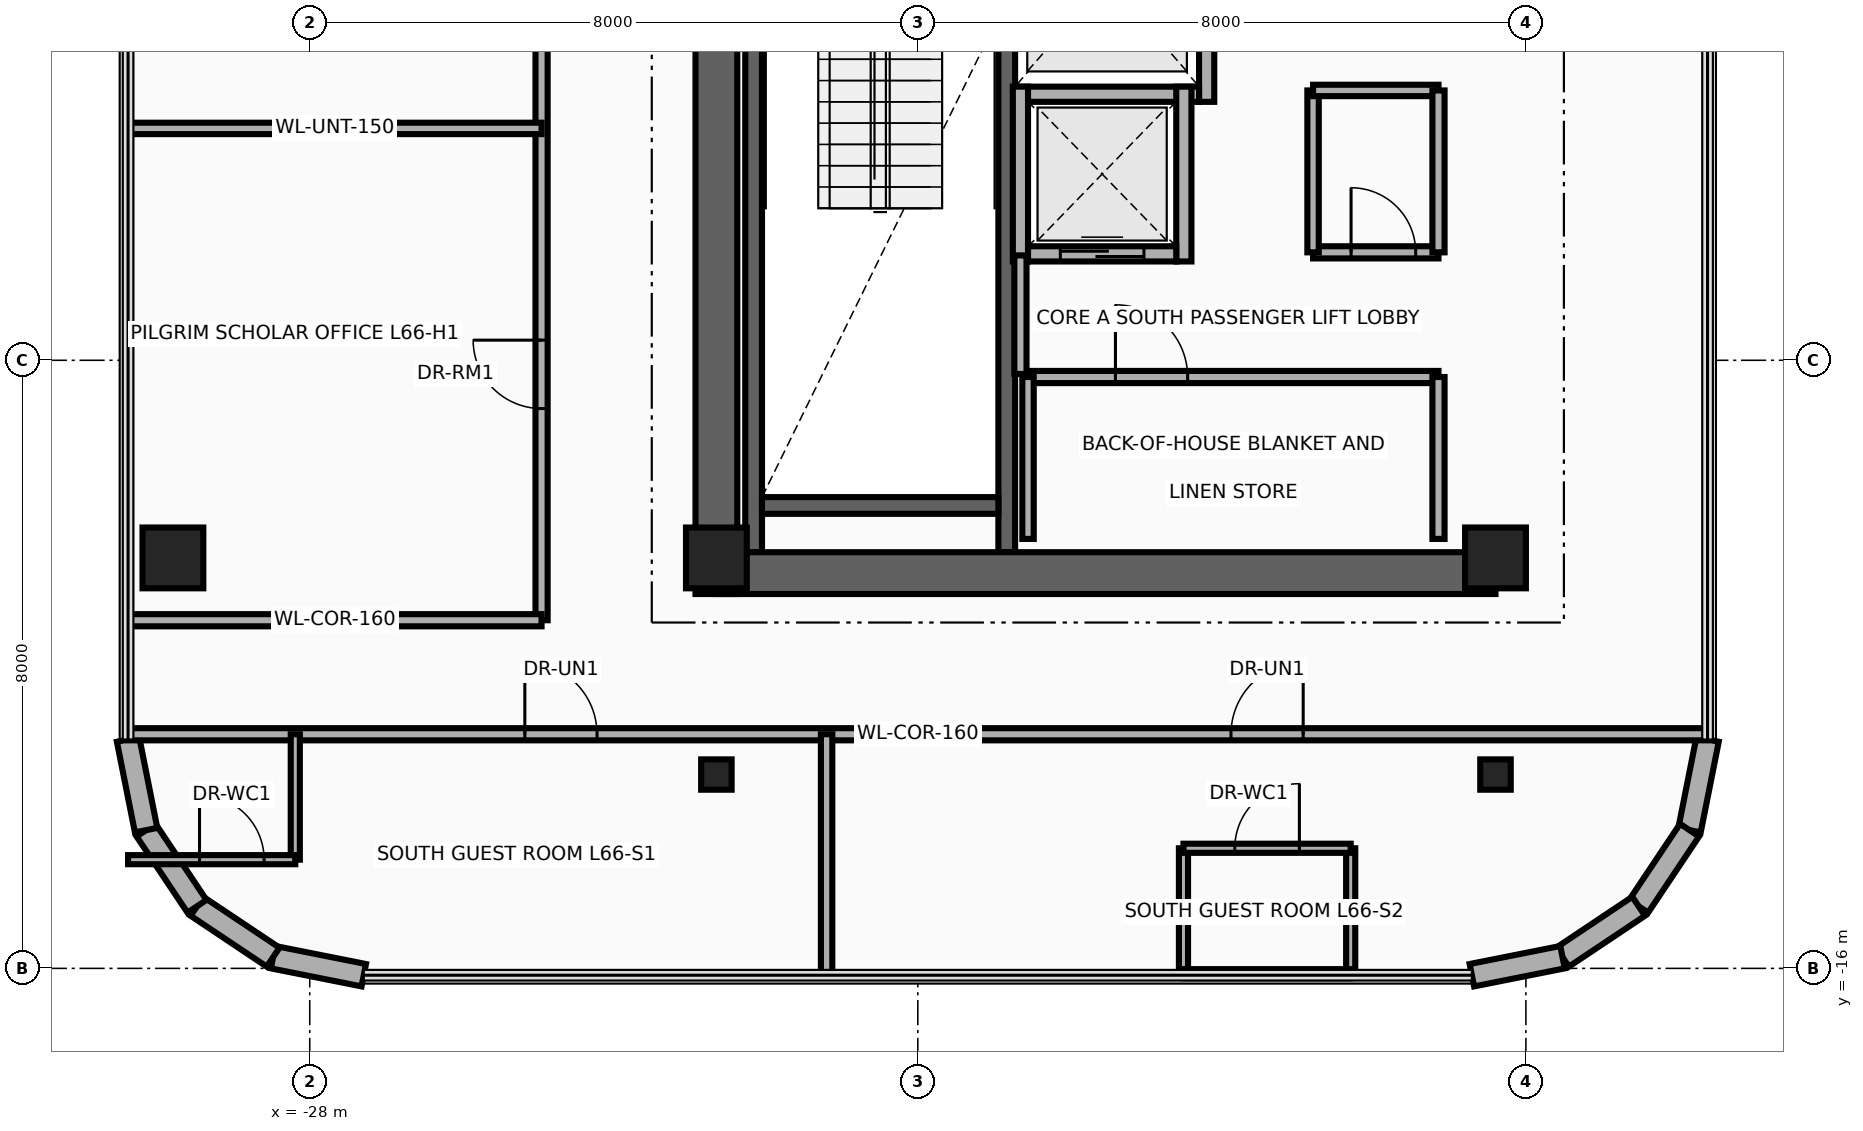
"""IFC4 building model, lengths in metres.
Left out: names, types, materials, properties, quantities, classifications, styles, units other than length and angle.
Written with IfcOpenShell. Run it as: python <this file> out.ifc"""

import sys

from ifc_helpers import new_model, si_unit, direction, frame, frame_2d, origin, origin_2d, place, context, subcontext, project, spatial, rectangle, i_section, extrude, source, transform, mapped, element, fill, save


model = new_model("IFC4")
c1 = context("Model", 3, precision=1e-05, world=origin(), true_north=direction((0.0, 1.0)))
c2 = subcontext(c1, "Body", "Model", "MODEL_VIEW")
j1 = project(units=[si_unit("LENGTHUNIT", "METRE"), si_unit("PLANEANGLEUNIT", "RADIAN")], contexts=[c1])
p1 = place(None, origin())
s1 = spatial("IfcSite", under=j1, at=p1, CompositionType="ELEMENT")
p2 = place(p1, origin())
s2 = spatial("IfcBuilding", under=s1, at=p2, CompositionType="ELEMENT")
p3 = place(p2, frame((0.0, 0.0, 254.5)))
s3 = spatial("IfcBuildingStorey", under=s2, at=p3, CompositionType="ELEMENT", Elevation=254.5)
for number, where, z_axis, x_axis in (
    (1, (-22.16, -10.525, 0.0), (0.0, 0.0, 1.0), (0.0, 1.0, 0.0)),
    (2, (-18.83, -10.525, 0.0), (0.0, 0.0, 1.0), (0.0, 1.0, 0.0)),
):
    element("IfcWall", number, at=place(p3, frame(where, z_axis=z_axis, x_axis=x_axis)), inside=s3, PredefinedType="SHEAR", context=c2, shape_type="SweptSolid", body=[
        extrude(rectangle(XDim=8.745, YDim=0.22, at=frame_2d((4.373, 0.0))), origin(), (0.0, 0.0, 1.0), 3.26),
    ])
p4 = place(p3, frame((-22.05, -9.91, 0.0), z_axis=(0.0, 0.0, 1.0), x_axis=(1.0, 0.0, 0.0)))
e3 = element("IfcWall", 3, at=p4, inside=s3, PredefinedType="SHEAR", context=c2, shape_type="SweptSolid", body=[
    extrude(rectangle(XDim=3.11, YDim=0.22, at=frame_2d((1.555, 0.0))), origin(), (0.0, 0.0, 1.0), 3.26),
])
p5 = place(p3, frame((-22.65, -11.075, 0.0), z_axis=(0.0, 0.0, 1.0), x_axis=(0.0, 1.0, 0.0)))
e4 = element("IfcWall", 4, at=p5, inside=s3, PredefinedType="SHEAR", context=c2, shape_type="SweptSolid", body=[
    extrude(rectangle(XDim=22.15, YDim=0.55, at=frame_2d((11.075, 0.0))), origin(), (0.0, 0.0, 1.0), 3.26),
])
p6 = place(p3, frame((-22.65, -10.8, 0.0), z_axis=(0.0, 0.0, 1.0), x_axis=(1.0, 0.0, 0.0)))
e5 = element("IfcWall", 5, at=p6, inside=s3, PredefinedType="SHEAR", context=c2, shape_type="SweptSolid", body=[
    extrude(rectangle(XDim=10.25, YDim=0.55, at=frame_2d((5.125, 0.0))), origin(), (0.0, 0.0, 1.0), 3.26),
])
m1 = source(origin(), c2, "Body", "SweptSolid", [
    extrude(rectangle(XDim=0.8, YDim=0.8, at=origin_2d()), origin(), (0.0, 0.0, 1.0), 3.5),
])
for number, where, z_axis, x_axis in (
    (6, (-29.8, -10.6, 0.0), (0.0, 0.0, 1.0), (1.0, 0.0, 0.0)),
    (7, (-22.65, -10.6, 0.0), (0.0, 0.0, 1.0), (1.0, 0.0, 0.0)),
    (8, (-12.4, -10.6, 0.0), (0.0, 0.0, 1.0), (1.0, 0.0, 0.0)),
):
    element("IfcColumn", number, at=place(p3, frame(where, z_axis=z_axis, x_axis=x_axis)), inside=s3, PredefinedType="COLUMN", context=c2, shape_type="MappedRepresentation", body=[
        mapped(m1, transform((0.0, 0.0, 0.0), x_axis=(1.0, 0.0, 0.0), y_axis=(0.0, 1.0, 0.0), z_axis=(0.0, 0.0, 1.0), scale=1.0)),
    ])
m2 = source(origin(), c2, "Body", "SweptSolid", [
    extrude(i_section(OverallWidth=0.401, OverallDepth=0.399, WebThickness=0.025, FlangeThickness=0.04, at=origin_2d()), origin(), (0.0, 0.0, 1.0), 3.5),
])
for number, where, z_axis, x_axis in (
    (9, (-22.65, -13.45, 0.0), (0.0, 0.0, 1.0), (1.0, 0.0, 0.0)),
    (10, (-12.4, -13.45, 0.0), (0.0, 0.0, 1.0), (1.0, 0.0, 0.0)),
):
    element("IfcColumn", number, at=place(p3, frame(where, z_axis=z_axis, x_axis=x_axis)), inside=s3, PredefinedType="COLUMN", context=c2, shape_type="MappedRepresentation", body=[
        mapped(m2, transform((0.0, 0.0, 0.0), x_axis=(1.0, 0.0, 0.0), y_axis=(0.0, 1.0, 0.0), z_axis=(0.0, 0.0, 1.0), scale=1.0)),
    ])
p7 = place(p3, frame((-9.61, -12.989, 0.0), z_axis=(0.0, 0.0, 1.0), x_axis=(-0.194996050505, -0.980804027463, 0.0)))
e11 = element("IfcWall", 11, at=p7, inside=s3, PredefinedType="SOLIDWALL", context=c2, shape_type="SweptSolid", body=[
    extrude(rectangle(XDim=1.216, YDim=0.3, at=frame_2d((0.608, 0.0))), origin(), (0.0, 0.0, 1.0), 3.26),
])
for number, where, z_axis, x_axis in (
    (12, (-9.847, -14.182, 0.0), (0.0, 0.0, 1.0), (-0.556, -0.831, 0.0)),
    (13, (-10.517, -15.183, 0.0), (0.0, 0.0, 1.0), (-0.831, -0.556, 0.0)),
):
    element("IfcWall", number, at=place(p3, frame(where, z_axis=z_axis, x_axis=x_axis)), inside=s3, PredefinedType="SOLIDWALL", context=c2, shape_type="SweptSolid", body=[
        extrude(rectangle(XDim=1.205, YDim=0.3, at=frame_2d((0.603, 0.0))), origin(), (0.0, 0.0, 1.0), 3.26),
    ])
for number, where, z_axis, x_axis in (
    (14, (-11.518, -15.853, 0.0), (0.0, 0.0, 1.0), (-0.981, -0.195, 0.0)),
    (15, (-27.289, -16.09, 0.0), (0.0, 0.0, 1.0), (-0.981, 0.195, 0.0)),
):
    element("IfcWall", number, at=place(p3, frame(where, z_axis=z_axis, x_axis=x_axis)), inside=s3, PredefinedType="SOLIDWALL", context=c2, shape_type="SweptSolid", body=[
        extrude(rectangle(XDim=1.216, YDim=0.3, at=frame_2d((0.608, 0.0))), origin(), (0.0, 0.0, 1.0), 3.26),
    ])
for number, where, z_axis, x_axis in (
    (16, (-28.482, -15.853, 0.0), (0.0, 0.0, 1.0), (-0.831, 0.556, 0.0)),
    (17, (-29.483, -15.183, 0.0), (0.0, 0.0, 1.0), (-0.556, 0.831, 0.0)),
):
    element("IfcWall", number, at=place(p3, frame(where, z_axis=z_axis, x_axis=x_axis)), inside=s3, PredefinedType="SOLIDWALL", context=c2, shape_type="SweptSolid", body=[
        extrude(rectangle(XDim=1.205, YDim=0.3, at=frame_2d((0.603, 0.0))), origin(), (0.0, 0.0, 1.0), 3.26),
    ])
p8 = place(p3, frame((-30.153, -14.182, 0.0), z_axis=(0.0, 0.0, 1.0), x_axis=(-0.194996050505, 0.980804027463, 0.0)))
e18 = element("IfcWall", 18, at=p8, inside=s3, PredefinedType="SOLIDWALL", context=c2, shape_type="SweptSolid", body=[
    extrude(rectangle(XDim=1.216, YDim=0.3, at=frame_2d((0.608, 0.0))), origin(), (0.0, 0.0, 1.0), 3.26),
])
p9 = place(p3, frame((-16.2, -4.6, 0.0), z_axis=(0.0, 0.0, 1.0), x_axis=(0.0, 1.0, 0.0)))
e19 = element("IfcWall", 19, at=p9, inside=s3, PredefinedType="MOVABLE", context=c2, shape_type="SweptSolid", body=[
    extrude(rectangle(XDim=3.2, YDim=0.2, at=frame_2d((1.6, 0.0))), origin(), (0.0, 0.0, 1.0), 3.26),
])
p10 = place(p3, frame((-18.72, -4.5, 0.0), z_axis=(0.0, 0.0, 1.0), x_axis=(1.0, 0.0, 0.0)))
e20 = element("IfcWall", 20, at=p10, inside=s3, PredefinedType="MOVABLE", context=c2, shape_type="SweptSolid", body=[
    extrude(rectangle(XDim=2.42, YDim=0.2, at=frame_2d((1.21, 0.0))), origin(), (0.0, 0.0, 1.0), 3.26),
])
for number, where, z_axis, x_axis in (
    (21, (-18.65, -6.7, 0.0), (0.0, 0.0, 1.0), (0.0, 1.0, 0.0)),
    (22, (-16.5, -6.7, 0.0), (0.0, 0.0, 1.0), (0.0, 1.0, 0.0)),
):
    element("IfcWall", number, at=place(p3, frame(where, z_axis=z_axis, x_axis=x_axis)), inside=s3, PredefinedType="MOVABLE", context=c2, shape_type="SweptSolid", body=[
        extrude(rectangle(XDim=2.3, YDim=0.2, at=frame_2d((1.15, 0.0))), origin(), (0.0, 0.0, 1.0), 3.26),
    ])
p11 = place(p3, frame((-18.55, -6.6, 0.0), z_axis=(0.0, 0.0, 1.0), x_axis=(1.0, 0.0, 0.0)))
e23 = element("IfcWall", 23, at=p11, inside=s3, PredefinedType="MOVABLE", context=c2, shape_type="SweptSolid", body=[
    extrude(rectangle(XDim=1.95, YDim=0.2, at=frame_2d((0.975, 0.0))), origin(), (0.0, 0.0, 1.0), 3.26),
])
p12 = place(p11, frame((0.425, 0.0, 0.0)))
e24 = element("IfcOpeningElement", 24, at=p12, cuts=e23, PredefinedType="OPENING", context=c2, shape_type="SweptSolid", body=[
    extrude(rectangle(XDim=1.1, YDim=2.1, at=frame_2d((0.55, 1.05))), frame((0.0, 0.115, 0.0), z_axis=(0.0, -1.0, 0.0), x_axis=(1.0, 0.0, 0.0)), (0.0, 0.0, 1.0), 0.23),
])
p13 = place(p3, frame((-18.65, -8.18, 0.0), z_axis=(0.0, 0.0, 1.0), x_axis=(0.0, 1.0, 0.0)))
e25 = element("IfcWall", 25, at=p13, inside=s3, PredefinedType="PARTITIONING", context=c2, shape_type="SweptSolid", body=[
    extrude(rectangle(XDim=1.56, YDim=0.16, at=frame_2d((0.78, 0.0))), origin(), (0.0, 0.0, 1.0), 3.26),
])
p14 = place(p3, frame((-18.55, -8.22, 0.0), z_axis=(0.0, 0.0, 1.0), x_axis=(1.0, 0.0, 0.0)))
e26 = element("IfcWall", 26, at=p14, inside=s3, PredefinedType="PARTITIONING", context=c2, shape_type="SweptSolid", body=[
    extrude(rectangle(XDim=5.4, YDim=0.16, at=frame_2d((2.7, 0.0))), origin(), (0.0, 0.0, 1.0), 3.26),
])
p15 = place(p14, frame((1.15, 0.0, 0.0)))
e27 = element("IfcOpeningElement", 27, at=p15, cuts=e26, PredefinedType="OPENING", context=c2, shape_type="SweptSolid", body=[
    extrude(rectangle(XDim=0.95, YDim=2.15, at=frame_2d((0.475, 1.075))), frame((0.0, 0.095, 0.0), z_axis=(0.0, -1.0, 0.0), x_axis=(1.0, 0.0, 0.0)), (0.0, 0.0, 1.0), 0.19),
])
p16 = place(p3, frame((-18.55, -10.35, 0.0), z_axis=(0.0, 0.0, 1.0), x_axis=(0.0, 1.0, 0.0)))
e28 = element("IfcWall", 28, at=p16, inside=s3, PredefinedType="PARTITIONING", context=c2, shape_type="SweptSolid", body=[
    extrude(rectangle(XDim=2.13, YDim=0.15, at=frame_2d((1.065, 0.0))), origin(), (0.0, 0.0, 1.0), 3.26),
])
p17 = place(p3, frame((-13.15, -10.35, 0.0), z_axis=(0.0, 0.0, 1.0), x_axis=(0.0, 1.0, 0.0)))
e29 = element("IfcWall", 29, at=p17, inside=s3, PredefinedType="PARTITIONING", context=c2, shape_type="SweptSolid", body=[
    extrude(rectangle(XDim=2.13, YDim=0.16, at=frame_2d((1.065, 0.0))), origin(), (0.0, 0.0, 1.0), 3.26),
])
p18 = place(p3, frame((-14.8, -6.58, 0.0), z_axis=(0.0, 0.0, 1.0), x_axis=(1.0, 0.0, 0.0)))
e30 = element("IfcWall", 30, at=p18, inside=s3, PredefinedType="PARTITIONING", context=c2, shape_type="SweptSolid", body=[
    extrude(rectangle(XDim=1.65, YDim=0.16, at=frame_2d((0.825, 0.0))), origin(), (0.0, 0.0, 1.0), 3.26),
])
p19 = place(p18, frame((0.5, 0.0, 0.0)))
e31 = element("IfcOpeningElement", 31, at=p19, cuts=e30, PredefinedType="OPENING", context=c2, shape_type="SweptSolid", body=[
    extrude(rectangle(XDim=0.85, YDim=2.05, at=frame_2d((0.425, 1.025))), frame((0.0, 0.095, 0.0), z_axis=(0.0, -1.0, 0.0), x_axis=(1.0, 0.0, 0.0)), (0.0, 0.0, 1.0), 0.19),
])
p20 = place(p3, frame((-14.8, -6.58, 0.0), z_axis=(0.0, 0.0, 1.0), x_axis=(0.0, 1.0, 0.0)))
e32 = element("IfcWall", 32, at=p20, inside=s3, PredefinedType="PARTITIONING", context=c2, shape_type="SweptSolid", body=[
    extrude(rectangle(XDim=2.13, YDim=0.15, at=frame_2d((1.065, 0.0))), origin(), (0.0, 0.0, 1.0), 3.26),
])
p21 = place(p3, frame((-14.8, -4.45, 0.0), z_axis=(0.0, 0.0, 1.0), x_axis=(1.0, 0.0, 0.0)))
e33 = element("IfcWall", 33, at=p21, inside=s3, PredefinedType="PARTITIONING", context=c2, shape_type="SweptSolid", body=[
    extrude(rectangle(XDim=1.65, YDim=0.15, at=frame_2d((0.825, 0.0))), origin(), (0.0, 0.0, 1.0), 3.26),
])
p22 = place(p3, frame((-13.15, -6.58, 0.0), z_axis=(0.0, 0.0, 1.0), x_axis=(0.0, 1.0, 0.0)))
e34 = element("IfcWall", 34, at=p22, inside=s3, PredefinedType="PARTITIONING", context=c2, shape_type="SweptSolid", body=[
    extrude(rectangle(XDim=2.13, YDim=0.16, at=frame_2d((1.065, 0.0))), origin(), (0.0, 0.0, 1.0), 3.26),
])
p23 = place(p3, frame((-24.95, -11.42, 0.0), z_axis=(0.0, 0.0, 1.0), x_axis=(0.0, 1.0, 0.0)))
e35 = element("IfcWall", 35, at=p23, inside=s3, PredefinedType="PARTITIONING", context=c2, shape_type="SweptSolid", body=[
    extrude(rectangle(XDim=20.22, YDim=0.16, at=frame_2d((10.11, 0.0))), origin(), (0.0, 0.0, 1.0), 2.544),
])
p24 = place(p23, frame((2.785, 0.0, 0.0)))
e36 = element("IfcOpeningElement", 36, at=p24, cuts=e35, PredefinedType="OPENING", context=c2, shape_type="SweptSolid", body=[
    extrude(rectangle(XDim=0.9, YDim=2.1, at=frame_2d((0.45, 1.05))), frame((0.0, 0.095, 0.0), z_axis=(0.0, -1.0, 0.0), x_axis=(1.0, 0.0, 0.0)), (0.0, 0.0, 1.0), 0.19),
])
p25 = place(p23, frame((9.256, 0.0, 0.0)))
e37 = element("IfcOpeningElement", 37, at=p25, cuts=e35, PredefinedType="OPENING", context=c2, shape_type="SweptSolid", body=[
    extrude(rectangle(XDim=0.9, YDim=2.1, at=frame_2d((0.45, 1.05))), frame((0.0, 0.095, 0.0), z_axis=(0.0, -1.0, 0.0), x_axis=(1.0, 0.0, 0.0)), (0.0, 0.0, 1.0), 0.19),
])
p26 = place(p23, frame((17.105, 0.0, 0.0)))
e38 = element("IfcOpeningElement", 38, at=p26, cuts=e35, PredefinedType="OPENING", context=c2, shape_type="SweptSolid", body=[
    extrude(rectangle(XDim=0.95, YDim=2.15, at=frame_2d((0.475, 1.075))), frame((0.0, 0.095, 0.0), z_axis=(0.0, -1.0, 0.0), x_axis=(1.0, 0.0, 0.0)), (0.0, 0.0, 1.0), 0.19),
])
p27 = place(p3, frame((-30.39, -4.949, 0.0), z_axis=(0.0, 0.0, 1.0), x_axis=(1.0, 0.0, 0.0)))
e39 = element("IfcWall", 39, at=p27, inside=s3, PredefinedType="PARTITIONING", context=c2, shape_type="SweptSolid", body=[
    extrude(rectangle(XDim=5.44, YDim=0.15, at=frame_2d((2.72, 0.0))), origin(), (0.0, 0.0, 1.0), 2.706),
])
p28 = place(p3, frame((-30.39, -12.92, 0.0), z_axis=(0.0, 0.0, 1.0), x_axis=(1.0, 0.0, 0.0)))
e40 = element("IfcWall", 40, at=p28, inside=s3, PredefinedType="PARTITIONING", context=c2, shape_type="SweptSolid", body=[
    extrude(rectangle(XDim=20.78, YDim=0.16, at=frame_2d((10.39, 0.0))), origin(), (0.0, 0.0, 1.0), 2.634),
])
p29 = place(p28, frame((5.22, 0.0, 0.0)))
e41 = element("IfcOpeningElement", 41, at=p29, cuts=e40, PredefinedType="OPENING", context=c2, shape_type="SweptSolid", body=[
    extrude(rectangle(XDim=0.95, YDim=2.15, at=frame_2d((0.475, 1.075))), frame((0.0, 0.095, 0.0), z_axis=(0.0, -1.0, 0.0), x_axis=(1.0, 0.0, 0.0)), (0.0, 0.0, 1.0), 0.19),
])
p30 = place(p28, frame((14.51, 0.0, 0.0)))
e42 = element("IfcOpeningElement", 42, at=p30, cuts=e40, PredefinedType="OPENING", context=c2, shape_type="SweptSolid", body=[
    extrude(rectangle(XDim=0.95, YDim=2.15, at=frame_2d((0.475, 1.075))), frame((0.0, 0.095, 0.0), z_axis=(0.0, -1.0, 0.0), x_axis=(1.0, 0.0, 0.0)), (0.0, 0.0, 1.0), 0.19),
])
p31 = place(p3, frame((-21.2, -16.09, 0.0), z_axis=(0.0, 0.0, 1.0), x_axis=(0.0, 1.0, 0.0)))
e43 = element("IfcWall", 43, at=p31, inside=s3, PredefinedType="PARTITIONING", context=c2, shape_type="SweptSolid", body=[
    extrude(rectangle(XDim=3.17, YDim=0.15, at=frame_2d((1.585, 0.0))), origin(), (0.0, 0.0, 1.0), 2.706),
])
p32 = place(p3, frame((-28.19, -14.57, 0.0), z_axis=(0.0, 0.0, 1.0), x_axis=(0.0, 1.0, 0.0)))
e44 = element("IfcWall", 44, at=p32, inside=s3, PredefinedType="PARTITIONING", context=c2, shape_type="SweptSolid", body=[
    extrude(rectangle(XDim=1.65, YDim=0.12, at=frame_2d((0.825, 0.0))), origin(), (0.0, 0.0, 1.0), 3.26),
])
p33 = place(p3, frame((-30.39, -14.57, 0.0), z_axis=(0.0, 0.0, 1.0), x_axis=(1.0, 0.0, 0.0)))
e45 = element("IfcWall", 45, at=p33, inside=s3, PredefinedType="PARTITIONING", context=c2, shape_type="SweptSolid", body=[
    extrude(rectangle(XDim=2.2, YDim=0.12, at=frame_2d((1.1, 0.0))), origin(), (0.0, 0.0, 1.0), 3.26),
])
p34 = place(p33, frame((0.94, 0.0, 0.0)))
e46 = element("IfcOpeningElement", 46, at=p34, cuts=e45, PredefinedType="OPENING", context=c2, shape_type="SweptSolid", body=[
    extrude(rectangle(XDim=0.85, YDim=2.1, at=frame_2d((0.425, 1.05))), frame((0.0, 0.075, 0.0), z_axis=(0.0, -1.0, 0.0), x_axis=(1.0, 0.0, 0.0)), (0.0, 0.0, 1.0), 0.15),
])
for number, where, z_axis, x_axis in (
    (47, (-16.505, -16.07, 0.0), (0.0, 0.0, 1.0), (0.0, 1.0, 0.0)),
    (48, (-14.305, -16.07, 0.0), (0.0, 0.0, 1.0), (0.0, 1.0, 0.0)),
):
    element("IfcWall", number, at=place(p3, frame(where, z_axis=z_axis, x_axis=x_axis)), inside=s3, PredefinedType="PARTITIONING", context=c2, shape_type="SweptSolid", body=[
        extrude(rectangle(XDim=1.65, YDim=0.12, at=frame_2d((0.825, 0.0))), origin(), (0.0, 0.0, 1.0), 3.26),
    ])
p35 = place(p3, frame((-16.505, -16.07, 0.0), z_axis=(0.0, 0.0, 1.0), x_axis=(1.0, 0.0, 0.0)))
e49 = element("IfcWall", 49, at=p35, inside=s3, PredefinedType="PARTITIONING", context=c2, shape_type="SweptSolid", body=[
    extrude(rectangle(XDim=2.2, YDim=0.12, at=frame_2d((1.1, 0.0))), origin(), (0.0, 0.0, 1.0), 3.26),
])
p36 = place(p3, frame((-16.505, -14.42, 0.0), z_axis=(0.0, 0.0, 1.0), x_axis=(1.0, 0.0, 0.0)))
e50 = element("IfcWall", 50, at=p36, inside=s3, PredefinedType="PARTITIONING", context=c2, shape_type="SweptSolid", body=[
    extrude(rectangle(XDim=2.2, YDim=0.12, at=frame_2d((1.1, 0.0))), origin(), (0.0, 0.0, 1.0), 3.26),
])
p37 = place(p36, frame((0.675, 0.0, 0.0)))
e51 = element("IfcOpeningElement", 51, at=p37, cuts=e50, PredefinedType="OPENING", context=c2, shape_type="SweptSolid", body=[
    extrude(rectangle(XDim=0.85, YDim=2.1, at=frame_2d((0.425, 1.05))), frame((0.0, 0.075, 0.0), z_axis=(0.0, -1.0, 0.0), x_axis=(1.0, 0.0, 0.0)), (0.0, 0.0, 1.0), 0.15),
])
p38 = place(p3, frame((-30.39, -11.42, 0.0), z_axis=(0.0, 0.0, 1.0), x_axis=(1.0, 0.0, 0.0)))
e52 = element("IfcWall", 52, at=p38, inside=s3, PredefinedType="PARTITIONING", context=c2, shape_type="SweptSolid", body=[
    extrude(rectangle(XDim=5.44, YDim=0.16, at=frame_2d((2.72, 0.0))), origin(), (0.0, 0.0, 1.0), 3.26),
])
p39 = place(p12, origin())
e53 = element("IfcDoor", 53, at=p39, inside=s3, OperationType="DOUBLE_DOOR_SLIDING", PredefinedType="DOOR", context=c2, shape_type="SweptSolid", body=[
    extrude(rectangle(XDim=1.1, YDim=2.1, at=frame_2d((0.55, 1.05))), frame((0.0, 0.025, 0.0), z_axis=(0.0, -1.0, 0.0), x_axis=(1.0, 0.0, 0.0)), (0.0, 0.0, 1.0), 0.05),
])
fill(e24, e53)
p40 = place(p15, origin())
e54 = element("IfcDoor", 54, at=p40, inside=s3, OperationType="SINGLE_SWING_RIGHT", PredefinedType="DOOR", context=c2, shape_type="SweptSolid", body=[
    extrude(rectangle(XDim=0.95, YDim=2.15, at=frame_2d((0.475, 1.075))), frame((0.0, 0.025, 0.0), z_axis=(0.0, -1.0, 0.0), x_axis=(1.0, 0.0, 0.0)), (0.0, 0.0, 1.0), 0.05),
])
fill(e27, e54)
p41 = place(p19, origin())
e55 = element("IfcDoor", 55, at=p41, inside=s3, OperationType="SINGLE_SWING_LEFT", PredefinedType="DOOR", context=c2, shape_type="SweptSolid", body=[
    extrude(rectangle(XDim=0.85, YDim=2.05, at=frame_2d((0.425, 1.025))), frame((0.0, 0.025, 0.0), z_axis=(0.0, -1.0, 0.0), x_axis=(1.0, 0.0, 0.0)), (0.0, 0.0, 1.0), 0.05),
])
fill(e31, e55)
p42 = place(p24, origin())
e56 = element("IfcDoor", 56, at=p42, inside=s3, OperationType="SINGLE_SWING_RIGHT", PredefinedType="DOOR", context=c2, shape_type="SweptSolid", body=[
    extrude(rectangle(XDim=0.9, YDim=2.1, at=frame_2d((0.45, 1.05))), frame((0.0, 0.025, 0.0), z_axis=(0.0, -1.0, 0.0), x_axis=(1.0, 0.0, 0.0)), (0.0, 0.0, 1.0), 0.05),
])
fill(e36, e56)
p43 = place(p29, origin())
e57 = element("IfcDoor", 57, at=p43, inside=s3, OperationType="SINGLE_SWING_RIGHT", PredefinedType="DOOR", context=c2, shape_type="SweptSolid", body=[
    extrude(rectangle(XDim=0.95, YDim=2.15, at=frame_2d((0.475, 1.075))), frame((0.0, 0.025, 0.0), z_axis=(0.0, -1.0, 0.0), x_axis=(1.0, 0.0, 0.0)), (0.0, 0.0, 1.0), 0.05),
])
fill(e41, e57)
p44 = place(p34, origin())
e58 = element("IfcDoor", 58, at=p44, inside=s3, OperationType="SINGLE_SWING_LEFT", PredefinedType="DOOR", context=c2, shape_type="SweptSolid", body=[
    extrude(rectangle(XDim=0.85, YDim=2.1, at=frame_2d((0.425, 1.05))), frame((0.0, 0.025, 0.0), z_axis=(0.0, -1.0, 0.0), x_axis=(1.0, 0.0, 0.0)), (0.0, 0.0, 1.0), 0.05),
])
fill(e46, e58)
p45 = place(p30, origin())
e59 = element("IfcDoor", 59, at=p45, inside=s3, OperationType="SINGLE_SWING_RIGHT", PredefinedType="DOOR", context=c2, shape_type="SweptSolid", body=[
    extrude(rectangle(XDim=0.95, YDim=2.15, at=frame_2d((0.475, 1.075))), frame((0.0, 0.025, 0.0), z_axis=(0.0, -1.0, 0.0), x_axis=(1.0, 0.0, 0.0)), (0.0, 0.0, 1.0), 0.05),
])
fill(e42, e59)
p46 = place(p37, origin())
e60 = element("IfcDoor", 60, at=p46, inside=s3, OperationType="SINGLE_SWING_LEFT", PredefinedType="DOOR", context=c2, shape_type="SweptSolid", body=[
    extrude(rectangle(XDim=0.85, YDim=2.1, at=frame_2d((0.425, 1.05))), frame((0.0, 0.025, 0.0), z_axis=(0.0, -1.0, 0.0), x_axis=(1.0, 0.0, 0.0)), (0.0, 0.0, 1.0), 0.05),
])
fill(e51, e60)
save(model, sys.argv[1])
